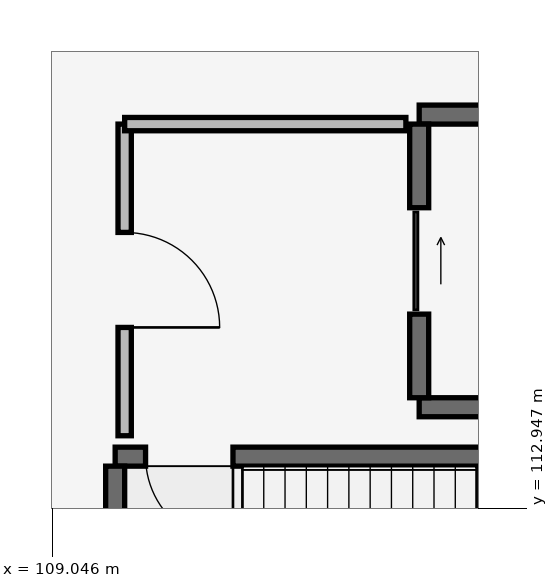
"""IFC4 building model, lengths in metres.
Left out: names, types, materials, properties, quantities, classifications, styles, units other than length and angle.
Written with IfcOpenShell. Run it as: python <this file> out.ifc"""

import sys

from ifc_helpers import new_model, si_unit, direction, frame, frame_2d, origin, place, context, subcontext, project, spatial, rectangle, extrude, element, fill, save


model = new_model("IFC4")
c1 = context("Model", 3, precision=1e-05, world=origin(), true_north=direction((0.0, 1.0)))
c2 = subcontext(c1, "Body", "Model", "MODEL_VIEW")
j1 = project(units=[si_unit("LENGTHUNIT", "METRE"), si_unit("PLANEANGLEUNIT", "RADIAN")], contexts=[c1])
p1 = place(None, origin())
s1 = spatial("IfcSite", under=j1, at=p1, CompositionType="ELEMENT")
p2 = place(p1, origin())
s2 = spatial("IfcBuilding", under=s1, at=p2, CompositionType="ELEMENT")
p3 = place(p2, frame((0.0, 0.0, -4.5)))
s3 = spatial("IfcBuildingStorey", under=s2, at=p3, CompositionType="ELEMENT", Elevation=-4.5)
p4 = place(p3, frame((109.875, 113.625, 0.0), z_axis=(0.0, 0.0, 1.0), x_axis=(1.0, 0.0, 0.0)))
e1 = element("IfcWall", 1, at=p4, inside=s3, PredefinedType="SHEAR", context=c2, shape_type="SweptSolid", body=[
    extrude(rectangle(XDim=7.27, YDim=0.25, at=frame_2d((3.635, 0.0))), origin(), (0.0, 0.0, 1.0), 4.15),
])
p5 = place(p4, frame((0.4, 0.0, 0.0)))
e2 = element("IfcOpeningElement", 2, at=p5, cuts=e1, PredefinedType="OPENING", context=c2, shape_type="SweptSolid", body=[
    extrude(rectangle(XDim=1.15, YDim=2.15, at=frame_2d((0.575, 1.075))), frame((0.0, 0.14, 0.0), z_axis=(0.0, -1.0, 0.0), x_axis=(1.0, 0.0, 0.0)), (0.0, 0.0, 1.0), 0.28),
])
p6 = place(p3, frame((109.875, 110.2, 0.0), z_axis=(0.0, 0.0, 1.0), x_axis=(0.0, 1.0, 0.0)))
e3 = element("IfcWall", 3, at=p6, inside=s3, PredefinedType="SHEAR", context=c2, shape_type="SweptSolid", body=[
    extrude(rectangle(XDim=3.3, YDim=0.25, at=frame_2d((1.65, 0.0))), origin(), (0.0, 0.0, 1.0), 4.15),
])
for number, where, z_axis, x_axis in (
    (4, (113.875, 114.275, 0.0), (0.0, 0.0, 1.0), (1.0, 0.0, 0.0)),
    (5, (113.875, 118.125, 0.0), (0.0, 0.0, 1.0), (1.0, 0.0, 0.0)),
):
    element("IfcWall", number, at=place(p3, frame(where, z_axis=z_axis, x_axis=x_axis)), inside=s3, PredefinedType="SHEAR", context=c2, shape_type="SweptSolid", body=[
        extrude(rectangle(XDim=3.65, YDim=0.25, at=frame_2d((1.825, 0.0))), origin(), (0.0, 0.0, 1.0), 4.15),
    ])
p7 = place(p3, frame((113.875, 114.4, 0.0), z_axis=(0.0, 0.0, 1.0), x_axis=(0.0, 1.0, 0.0)))
e6 = element("IfcWall", 6, at=p7, inside=s3, PredefinedType="SHEAR", context=c2, shape_type="SweptSolid", body=[
    extrude(rectangle(XDim=3.6, YDim=0.25, at=frame_2d((1.8, 0.0))), origin(), (0.0, 0.0, 1.0), 4.15),
])
p8 = place(p7, frame((1.1, 0.0, 0.0)))
e7 = element("IfcOpeningElement", 7, at=p8, cuts=e6, PredefinedType="OPENING", context=c2, shape_type="SweptSolid", body=[
    extrude(rectangle(XDim=1.4, YDim=2.2, at=frame_2d((0.7, 1.1))), frame((0.0, 0.14, 0.0), z_axis=(0.0, -1.0, 0.0), x_axis=(1.0, 0.0, 0.0)), (0.0, 0.0, 1.0), 0.28),
])
p9 = place(p3, frame((110.0, 113.9, 0.0), z_axis=(0.0, 0.0, 1.0), x_axis=(0.0, 1.0, 0.0)))
e8 = element("IfcWall", 8, at=p9, inside=s3, PredefinedType="PARTITIONING", context=c2, shape_type="SweptSolid", body=[
    extrude(rectangle(XDim=4.1, YDim=0.175, at=frame_2d((2.05, 0.0))), origin(), (0.0, 0.0, 1.0), 4.15),
])
p10 = place(p9, frame((1.425, 0.0, 0.0)))
e9 = element("IfcOpeningElement", 9, at=p10, cuts=e8, PredefinedType="OPENING", context=c2, shape_type="SweptSolid", body=[
    extrude(rectangle(XDim=1.25, YDim=2.2, at=frame_2d((0.625, 1.1))), frame((0.0, 0.103, 0.0), z_axis=(0.0, -1.0, 0.0), x_axis=(1.0, 0.0, 0.0)), (0.0, 0.0, 1.0), 0.205),
])
p11 = place(p3, frame((110.0, 118.0, 0.0), z_axis=(0.0, 0.0, 1.0), x_axis=(1.0, 0.0, 0.0)))
e10 = element("IfcWall", 10, at=p11, inside=s3, PredefinedType="PARTITIONING", context=c2, shape_type="SweptSolid", body=[
    extrude(rectangle(XDim=3.7, YDim=0.175, at=frame_2d((1.85, 0.0))), origin(), (0.0, 0.0, 1.0), 4.15),
])
p12 = place(p5, frame((1.15, 0.0, 0.0), z_axis=(0.0, 0.0, 1.0), x_axis=(-1.0, 0.0, 0.0)))
e11 = element("IfcDoor", 11, at=p12, inside=s3, OperationType="SINGLE_SWING_RIGHT", PredefinedType="DOOR", context=c2, shape_type="SweptSolid", body=[
    extrude(rectangle(XDim=1.15, YDim=2.15, at=frame_2d((0.575, 1.075))), frame((0.0, 0.025, 0.0), z_axis=(0.0, -1.0, 0.0), x_axis=(1.0, 0.0, 0.0)), (0.0, 0.0, 1.0), 0.05),
])
fill(e2, e11)
p13 = place(p8, origin())
e12 = element("IfcDoor", 12, at=p13, inside=s3, OperationType="SLIDING_TO_RIGHT", PredefinedType="DOOR", context=c2, shape_type="SweptSolid", body=[
    extrude(rectangle(XDim=1.4, YDim=2.2, at=frame_2d((0.7, 1.1))), frame((0.0, 0.025, 0.0), z_axis=(0.0, -1.0, 0.0), x_axis=(1.0, 0.0, 0.0)), (0.0, 0.0, 1.0), 0.05),
])
fill(e7, e12)
p14 = place(p10, frame((1.25, 0.0, 0.0), z_axis=(0.0, 0.0, 1.0), x_axis=(-1.0, 0.0, 0.0)))
e13 = element("IfcDoor", 13, at=p14, inside=s3, OperationType="SINGLE_SWING_LEFT", PredefinedType="DOOR", context=c2, shape_type="SweptSolid", body=[
    extrude(rectangle(XDim=1.25, YDim=2.2, at=frame_2d((0.625, 1.1))), frame((0.0, 0.025, 0.0), z_axis=(0.0, -1.0, 0.0), x_axis=(1.0, 0.0, 0.0)), (0.0, 0.0, 1.0), 0.05),
])
fill(e9, e13)
save(model, sys.argv[1])
